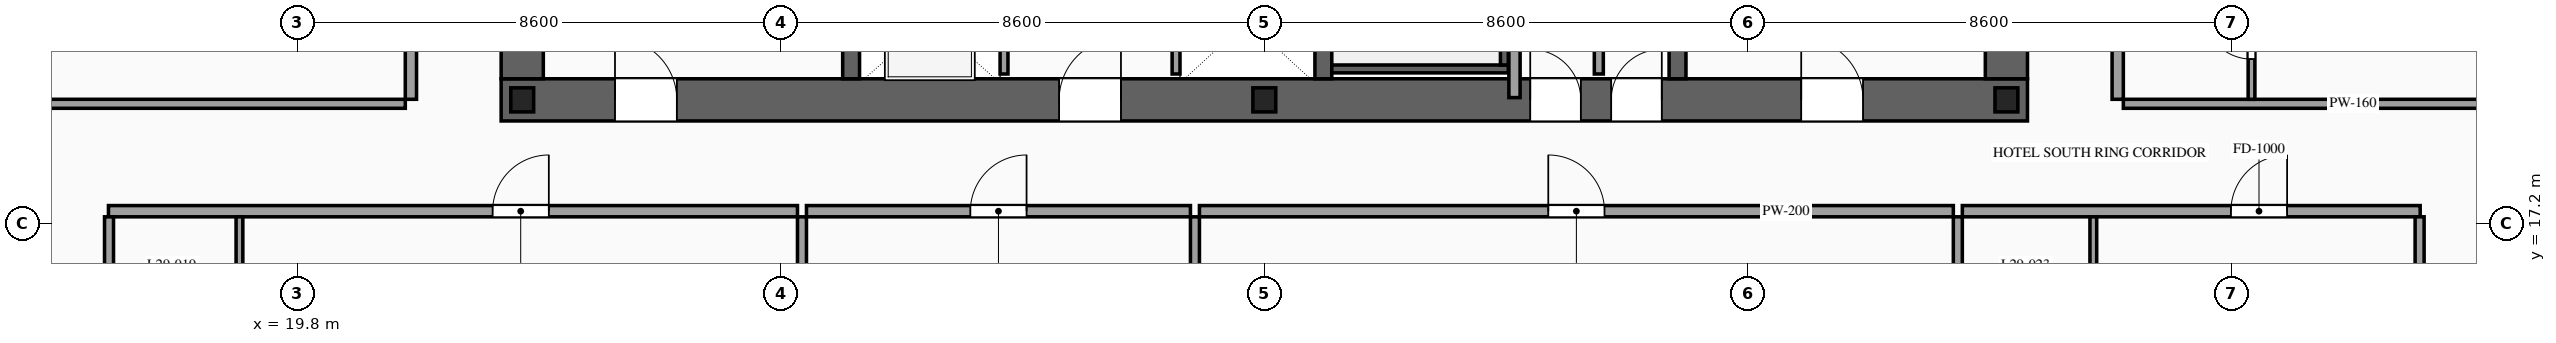
"""IFC4 building model, lengths in metres.
Left out: names, types, materials, properties, quantities, classifications, styles, units other than length and angle.
Written with IfcOpenShell. Run it as: python <this file> out.ifc"""

import sys

from ifc_helpers import new_model, si_unit, direction, frame, frame_2d, origin, origin_2d, place, context, subcontext, project, spatial, rectangle, i_section, extrude, source, transform, mapped, element, fill, save


model = new_model("IFC4")
c1 = context("Model", 3, precision=1e-05, world=origin(), true_north=direction((0.0, 1.0)))
c2 = subcontext(c1, "Body", "Model", "MODEL_VIEW")
j1 = project(units=[si_unit("LENGTHUNIT", "METRE"), si_unit("PLANEANGLEUNIT", "RADIAN")], contexts=[c1])
p1 = place(None, origin())
s1 = spatial("IfcSite", under=j1, at=p1, CompositionType="ELEMENT")
p2 = place(p1, origin())
s2 = spatial("IfcBuilding", under=s1, at=p2, CompositionType="ELEMENT")
p3 = place(p2, frame((0.0, 0.0, 111.8)))
s3 = spatial("IfcBuildingStorey", under=s2, at=p3, CompositionType="ELEMENT", Elevation=111.8)
p4 = place(p3, frame((23.425, 19.4, 0.0), z_axis=(0.0, 0.0, 1.0), x_axis=(1.0, 0.0, 0.0)))
e1 = element("IfcWall", 1, at=p4, inside=s3, PredefinedType="SHEAR", context=c2, shape_type="SweptSolid", body=[
    extrude(rectangle(XDim=27.15, YDim=0.75, at=frame_2d((13.575, 0.0))), origin(), (0.0, 0.0, 1.0), 3.6),
])
p5 = place(p4, frame((2.025, 0.0, 0.0)))
e2 = element("IfcOpeningElement", 2, at=p5, cuts=e1, PredefinedType="OPENING", context=c2, shape_type="SweptSolid", body=[
    extrude(rectangle(XDim=1.1, YDim=2.2, at=frame_2d((0.55, 1.1))), frame((0.0, 0.39, 0.0), z_axis=(0.0, -1.0, 0.0), x_axis=(1.0, 0.0, 0.0)), (0.0, 0.0, 1.0), 0.78),
])
p6 = place(p4, frame((9.925, 0.0, 0.0)))
e3 = element("IfcOpeningElement", 3, at=p6, cuts=e1, PredefinedType="OPENING", context=c2, shape_type="SweptSolid", body=[
    extrude(rectangle(XDim=1.1, YDim=2.2, at=frame_2d((0.55, 1.1))), frame((0.0, 0.39, 0.0), z_axis=(0.0, -1.0, 0.0), x_axis=(1.0, 0.0, 0.0)), (0.0, 0.0, 1.0), 0.78),
])
p7 = place(p4, frame((23.125, 0.0, 0.0)))
e4 = element("IfcOpeningElement", 4, at=p7, cuts=e1, PredefinedType="OPENING", context=c2, shape_type="SweptSolid", body=[
    extrude(rectangle(XDim=1.1, YDim=2.2, at=frame_2d((0.55, 1.1))), frame((0.0, 0.39, 0.0), z_axis=(0.0, -1.0, 0.0), x_axis=(1.0, 0.0, 0.0)), (0.0, 0.0, 1.0), 0.78),
])
p8 = place(p4, frame((19.745, 0.0, 0.0)))
e5 = element("IfcOpeningElement", 5, at=p8, cuts=e1, PredefinedType="OPENING", context=c2, shape_type="SweptSolid", body=[
    extrude(rectangle(XDim=0.9, YDim=2.15, at=frame_2d((0.45, 1.075))), frame((0.0, 0.39, 0.0), z_axis=(0.0, -1.0, 0.0), x_axis=(1.0, 0.0, 0.0)), (0.0, 0.0, 1.0), 0.78),
])
p9 = place(p4, frame((18.305, 0.0, 0.0)))
e6 = element("IfcOpeningElement", 6, at=p9, cuts=e1, PredefinedType="OPENING", context=c2, shape_type="SweptSolid", body=[
    extrude(rectangle(XDim=0.9, YDim=2.15, at=frame_2d((0.45, 1.075))), frame((0.0, 0.39, 0.0), z_axis=(0.0, -1.0, 0.0), x_axis=(1.0, 0.0, 0.0)), (0.0, 0.0, 1.0), 0.78),
])
m1 = source(origin(), c2, "Body", "SweptSolid", [
    extrude(rectangle(XDim=12.05, YDim=0.75, at=frame_2d((6.025, 0.0))), origin(), (0.0, 0.0, 1.0), 3.6),
])
for number, where, z_axis, x_axis in (
    (7, (23.8, 19.775, 0.0), (0.0, 0.0, 1.0), (0.0, 1.0, 0.0)),
    (8, (50.2, 19.775, 0.0), (0.0, 0.0, 1.0), (0.0, 1.0, 0.0)),
):
    element("IfcWall", number, at=place(p3, frame(where, z_axis=z_axis, x_axis=x_axis)), inside=s3, PredefinedType="SHEAR", context=c2, shape_type="MappedRepresentation", body=[
        mapped(m1, transform((0.0, 0.0, 0.0), scale=1.0)),
    ])
m2 = source(origin(), c2, "Body", "SweptSolid", [
    extrude(rectangle(XDim=12.05, YDim=0.3, at=frame_2d((6.025, 0.0))), origin(), (0.0, 0.0, 1.0), 3.6),
])
for number, where, z_axis, x_axis in (
    (9, (29.65, 19.775, 0.0), (0.0, 0.0, 1.0), (0.0, 1.0, 0.0)),
    (10, (38.05, 19.775, 0.0), (0.0, 0.0, 1.0), (0.0, 1.0, 0.0)),
    (11, (44.35, 19.775, 0.0), (0.0, 0.0, 1.0), (0.0, 1.0, 0.0)),
):
    element("IfcWall", number, at=place(p3, frame(where, z_axis=z_axis, x_axis=x_axis)), inside=s3, PredefinedType="SOLIDWALL", context=c2, shape_type="MappedRepresentation", body=[
        mapped(m2, transform((0.0, 0.0, 0.0), scale=1.0)),
    ])
m3 = source(origin(), c2, "Body", "SweptSolid", [
    extrude(i_section(OverallWidth=0.407, OverallDepth=0.428, WebThickness=0.02, FlangeThickness=0.035, at=origin_2d()), origin(), (0.0, 0.0, 1.0), 3.6),
])
for number, where, z_axis, x_axis in (
    (12, (23.8, 19.4, 0.0), (0.0, 0.0, 1.0), (1.0, 0.0, 0.0)),
    (13, (37.0, 19.4, 0.0), (0.0, 0.0, 1.0), (1.0, 0.0, 0.0)),
    (14, (50.2, 19.4, 0.0), (0.0, 0.0, 1.0), (1.0, 0.0, 0.0)),
):
    element("IfcColumn", number, at=place(p3, frame(where, z_axis=z_axis, x_axis=x_axis)), inside=s3, PredefinedType="COLUMN", context=c2, shape_type="MappedRepresentation", body=[
        mapped(m3, transform((0.0, 0.0, 0.0), scale=1.0)),
    ])
p10 = place(p3, frame((32.37, 19.86, 0.0), z_axis=(0.0, 0.0, 1.0), x_axis=(0.0, 1.0, 0.0)))
e15 = element("IfcWall", 15, at=p10, inside=s3, PredefinedType="SOLIDWALL", context=c2, shape_type="SweptSolid", body=[
    extrude(rectangle(XDim=2.04, YDim=0.14, at=frame_2d((1.02, 0.0))), origin(), (0.0, 0.0, 1.0), 3.38),
])
p11 = place(p10, frame((0.47, 0.0, 0.0)))
e16 = element("IfcOpeningElement", 16, at=p11, cuts=e15, PredefinedType="OPENING", context=c2, shape_type="SweptSolid", body=[
    extrude(rectangle(XDim=1.1, YDim=2.2, at=frame_2d((0.55, 1.1))), frame((0.0, 0.085, 0.0), z_axis=(0.0, -1.0, 0.0), x_axis=(1.0, 0.0, 0.0)), (0.0, 0.0, 1.0), 0.17),
])
m4 = source(origin(), c2, "Body", "SweptSolid", [
    extrude(rectangle(XDim=2.04, YDim=0.14, at=frame_2d((1.02, 0.0))), origin(), (0.0, 0.0, 1.0), 3.38),
])
p12 = place(p3, frame((35.43, 19.86, 0.0), z_axis=(0.0, 0.0, 1.0), x_axis=(0.0, 1.0, 0.0)))
e17 = element("IfcWall", 17, at=p12, inside=s3, PredefinedType="SOLIDWALL", context=c2, shape_type="MappedRepresentation", body=[
    mapped(m4, transform((0.0, 0.0, 0.0), scale=1.0)),
])
m5 = source(origin(), c2, "Body", "SweptSolid", [
    extrude(rectangle(XDim=3.14, YDim=0.14, at=frame_2d((1.57, 0.0))), origin(), (0.0, 0.0, 1.0), 3.38),
])
p13 = place(p3, frame((38.2, 19.95, 0.0), z_axis=(0.0, 0.0, 1.0), x_axis=(1.0, 0.0, 0.0)))
e18 = element("IfcWall", 18, at=p13, inside=s3, PredefinedType="SOLIDWALL", context=c2, shape_type="MappedRepresentation", body=[
    mapped(m5, transform((0.0, 0.0, 0.0), scale=1.0)),
])
m6 = source(origin(), c2, "Body", "SweptSolid", [
    extrude(rectangle(XDim=8.94, YDim=0.14, at=frame_2d((4.47, 0.0))), origin(), (0.0, 0.0, 1.0), 3.38),
])
p14 = place(p3, frame((41.27, 20.02, 0.0), z_axis=(0.0, 0.0, 1.0), x_axis=(0.0, 1.0, 0.0)))
e19 = element("IfcWall", 19, at=p14, inside=s3, PredefinedType="SOLIDWALL", context=c2, shape_type="MappedRepresentation", body=[
    mapped(m6, transform((0.0, 0.0, 0.0), scale=1.0)),
])
m7 = source(origin(), c2, "Body", "SweptSolid", [
    extrude(rectangle(XDim=1.34, YDim=0.16, at=frame_2d((0.67, 0.0))), origin(), (0.0, 0.0, 1.0), 3.38),
])
p15 = place(p3, frame((42.95, 19.86, 0.0), z_axis=(0.0, 0.0, 1.0), x_axis=(0.0, 1.0, 0.0)))
e20 = element("IfcWall", 20, at=p15, inside=s3, PredefinedType="PARTITIONING", context=c2, shape_type="MappedRepresentation", body=[
    mapped(m7, transform((0.0, 0.0, 0.0), scale=1.0)),
])
m8 = source(origin(), c2, "Body", "SweptSolid", [
    extrude(rectangle(XDim=6.51, YDim=0.2, at=frame_2d((3.255, 0.0))), origin(), (0.0, 0.0, 1.0), 3.38),
])
p16 = place(p3, frame((41.45, 19.44, 0.0), z_axis=(0.0, 0.0, 1.0), x_axis=(0.0, 1.0, 0.0)))
e21 = element("IfcWall", 21, at=p16, inside=s3, PredefinedType="PARTITIONING", context=c2, shape_type="MappedRepresentation", body=[
    mapped(m8, transform((0.0, 0.0, 0.0), scale=1.0)),
])
p17 = place(p3, frame((16.44, 17.42, 0.0), z_axis=(0.0, 0.0, 1.0), x_axis=(1.0, 0.0, 0.0)))
e22 = element("IfcWall", 22, at=p17, inside=s3, PredefinedType="PARTITIONING", context=c2, shape_type="SweptSolid", body=[
    extrude(rectangle(XDim=12.256, YDim=0.2, at=frame_2d((6.128, 0.0))), origin(), (0.0, 0.0, 1.0), 3.38),
])
p18 = place(p17, frame((6.833, 0.0, 0.0)))
e23 = element("IfcOpeningElement", 23, at=p18, cuts=e22, PredefinedType="OPENING", context=c2, shape_type="SweptSolid", body=[
    extrude(rectangle(XDim=1.0, YDim=2.2, at=frame_2d((0.5, 1.1))), frame((0.0, 0.115, 0.0), z_axis=(0.0, -1.0, 0.0), x_axis=(1.0, 0.0, 0.0)), (0.0, 0.0, 1.0), 0.23),
])
m9 = source(origin(), c2, "Body", "SweptSolid", [
    extrude(rectangle(XDim=14.97, YDim=0.16, at=frame_2d((7.485, 0.0))), origin(), (0.0, 0.0, 1.0), 3.38),
])
p19 = place(p3, frame((28.776, 2.35, 0.0), z_axis=(0.0, 0.0, 1.0), x_axis=(0.0, 1.0, 0.0)))
e24 = element("IfcWall", 24, at=p19, inside=s3, PredefinedType="PARTITIONING", context=c2, shape_type="MappedRepresentation", body=[
    mapped(m9, transform((0.0, 0.0, 0.0), scale=1.0)),
])
m10 = source(origin(), c2, "Body", "SweptSolid", [
    extrude(rectangle(XDim=2.42, YDim=0.12, at=frame_2d((1.21, 0.0))), origin(), (0.0, 0.0, 1.0), 3.38),
])
p20 = place(p3, frame((18.77, 14.9, 0.0), z_axis=(0.0, 0.0, 1.0), x_axis=(0.0, 1.0, 0.0)))
e25 = element("IfcWall", 25, at=p20, inside=s3, PredefinedType="PARTITIONING", context=c2, shape_type="MappedRepresentation", body=[
    mapped(m10, transform((0.0, 0.0, 0.0), scale=1.0)),
])
p21 = place(p3, frame((28.856, 17.42, 0.0), z_axis=(0.0, 0.0, 1.0), x_axis=(1.0, 0.0, 0.0)))
e26 = element("IfcWall", 26, at=p21, inside=s3, PredefinedType="PARTITIONING", context=c2, shape_type="SweptSolid", body=[
    extrude(rectangle(XDim=6.83, YDim=0.2, at=frame_2d((3.415, 0.0))), origin(), (0.0, 0.0, 1.0), 3.38),
])
p22 = place(p21, frame((2.915, 0.0, 0.0)))
e27 = element("IfcOpeningElement", 27, at=p22, cuts=e26, PredefinedType="OPENING", context=c2, shape_type="SweptSolid", body=[
    extrude(rectangle(XDim=1.0, YDim=2.2, at=frame_2d((0.5, 1.1))), frame((0.0, 0.115, 0.0), z_axis=(0.0, -1.0, 0.0), x_axis=(1.0, 0.0, 0.0)), (0.0, 0.0, 1.0), 0.23),
])
p23 = place(p3, frame((35.766, 2.35, 0.0), z_axis=(0.0, 0.0, 1.0), x_axis=(0.0, 1.0, 0.0)))
e28 = element("IfcWall", 28, at=p23, inside=s3, PredefinedType="PARTITIONING", context=c2, shape_type="MappedRepresentation", body=[
    mapped(m9, transform((0.0, 0.0, 0.0), scale=1.0)),
])
p24 = place(p3, frame((35.846, 17.42, 0.0), z_axis=(0.0, 0.0, 1.0), x_axis=(1.0, 0.0, 0.0)))
e29 = element("IfcWall", 29, at=p24, inside=s3, PredefinedType="PARTITIONING", context=c2, shape_type="SweptSolid", body=[
    extrude(rectangle(XDim=13.41, YDim=0.2, at=frame_2d((6.705, 0.0))), origin(), (0.0, 0.0, 1.0), 3.38),
])
p25 = place(p24, frame((6.205, 0.0, 0.0)))
e30 = element("IfcOpeningElement", 30, at=p25, cuts=e29, PredefinedType="OPENING", context=c2, shape_type="SweptSolid", body=[
    extrude(rectangle(XDim=1.0, YDim=2.2, at=frame_2d((0.5, 1.1))), frame((0.0, 0.115, 0.0), z_axis=(0.0, -1.0, 0.0), x_axis=(1.0, 0.0, 0.0)), (0.0, 0.0, 1.0), 0.23),
])
p26 = place(p3, frame((49.336, 2.35, 0.0), z_axis=(0.0, 0.0, 1.0), x_axis=(0.0, 1.0, 0.0)))
e31 = element("IfcWall", 31, at=p26, inside=s3, PredefinedType="PARTITIONING", context=c2, shape_type="MappedRepresentation", body=[
    mapped(m9, transform((0.0, 0.0, 0.0), scale=1.0)),
])
p27 = place(p3, frame((49.416, 17.42, 0.0), z_axis=(0.0, 0.0, 1.0), x_axis=(1.0, 0.0, 0.0)))
e32 = element("IfcWall", 32, at=p27, inside=s3, PredefinedType="PARTITIONING", context=c2, shape_type="SweptSolid", body=[
    extrude(rectangle(XDim=8.144, YDim=0.2, at=frame_2d((4.072, 0.0))), origin(), (0.0, 0.0, 1.0), 3.38),
])
p28 = place(p27, frame((4.777, 0.0, 0.0)))
e33 = element("IfcOpeningElement", 33, at=p28, cuts=e32, PredefinedType="OPENING", context=c2, shape_type="SweptSolid", body=[
    extrude(rectangle(XDim=1.0, YDim=2.2, at=frame_2d((0.5, 1.1))), frame((0.0, 0.115, 0.0), z_axis=(0.0, -1.0, 0.0), x_axis=(1.0, 0.0, 0.0)), (0.0, 0.0, 1.0), 0.23),
])
m11 = source(origin(), c2, "Body", "SweptSolid", [
    extrude(rectangle(XDim=14.82, YDim=0.16, at=frame_2d((7.41, 0.0))), origin(), (0.0, 0.0, 1.0), 3.38),
])
for number, where, z_axis, x_axis in (
    (34, (16.45, 2.5, 0.0), (0.0, 0.0, 1.0), (0.0, 1.0, 0.0)),
    (35, (57.55, 2.5, 0.0), (0.0, 0.0, 1.0), (0.0, 1.0, 0.0)),
):
    element("IfcWall", number, at=place(p3, frame(where, z_axis=z_axis, x_axis=x_axis)), inside=s3, PredefinedType="PARTITIONING", context=c2, shape_type="MappedRepresentation", body=[
        mapped(m11, transform((0.0, 0.0, 0.0), scale=1.0)),
    ])
p29 = place(p3, frame((51.746, 14.9, 0.0), z_axis=(0.0, 0.0, 1.0), x_axis=(0.0, 1.0, 0.0)))
e36 = element("IfcWall", 36, at=p29, inside=s3, PredefinedType="PARTITIONING", context=c2, shape_type="MappedRepresentation", body=[
    mapped(m10, transform((0.0, 0.0, 0.0), scale=1.0)),
])
p30 = place(p3, frame((21.82, 19.41, 0.0), z_axis=(0.0, 0.0, 1.0), x_axis=(0.0, 1.0, 0.0)))
e37 = element("IfcWall", 37, at=p30, inside=s3, PredefinedType="PARTITIONING", context=c2, shape_type="SweptSolid", body=[
    extrude(rectangle(XDim=12.78, YDim=0.2, at=frame_2d((6.39, 0.0))), origin(), (0.0, 0.0, 1.0), 3.38),
])
p31 = place(p30, frame((5.89, 0.0, 0.0)))
e38 = element("IfcOpeningElement", 38, at=p31, cuts=e37, PredefinedType="OPENING", context=c2, shape_type="SweptSolid", body=[
    extrude(rectangle(XDim=1.0, YDim=2.2, at=frame_2d((0.5, 1.1))), frame((0.0, 0.115, 0.0), z_axis=(0.0, -1.0, 0.0), x_axis=(1.0, 0.0, 0.0)), (0.0, 0.0, 1.0), 0.23),
])
m12 = source(origin(), c2, "Body", "SweptSolid", [
    extrude(rectangle(XDim=8.17, YDim=0.16, at=frame_2d((4.085, 0.0))), origin(), (0.0, 0.0, 1.0), 2.875),
])
p32 = place(p3, frame((13.55, 19.33, 0.0), z_axis=(0.0, 0.0, 1.0), x_axis=(1.0, 0.0, 0.0)))
e39 = element("IfcWall", 39, at=p32, inside=s3, PredefinedType="PARTITIONING", context=c2, shape_type="MappedRepresentation", body=[
    mapped(m12, transform((0.0, 0.0, 0.0), scale=1.0)),
])
p33 = place(p3, frame((52.18, 19.41, 0.0), z_axis=(0.0, 0.0, 1.0), x_axis=(0.0, 1.0, 0.0)))
e40 = element("IfcWall", 40, at=p33, inside=s3, PredefinedType="PARTITIONING", context=c2, shape_type="SweptSolid", body=[
    extrude(rectangle(XDim=6.31, YDim=0.2, at=frame_2d((3.155, 0.0))), origin(), (0.0, 0.0, 1.0), 3.38),
])
p34 = place(p33, frame((3.835, 0.0, 0.0)))
e41 = element("IfcOpeningElement", 41, at=p34, cuts=e40, PredefinedType="OPENING", context=c2, shape_type="SweptSolid", body=[
    extrude(rectangle(XDim=1.0, YDim=2.2, at=frame_2d((0.5, 1.1))), frame((0.0, 0.115, 0.0), z_axis=(0.0, -1.0, 0.0), x_axis=(1.0, 0.0, 0.0)), (0.0, 0.0, 1.0), 0.23),
])
p35 = place(p3, frame((52.28, 19.33, 0.0), z_axis=(0.0, 0.0, 1.0), x_axis=(1.0, 0.0, 0.0)))
e42 = element("IfcWall", 42, at=p35, inside=s3, PredefinedType="PARTITIONING", context=c2, shape_type="MappedRepresentation", body=[
    mapped(m12, transform((0.0, 0.0, 0.0), scale=1.0)),
])
p36 = place(p3, frame((54.56, 19.41, 0.0), z_axis=(0.0, 0.0, 1.0), x_axis=(0.0, 1.0, 0.0)))
e43 = element("IfcWall", 43, at=p36, inside=s3, PredefinedType="PARTITIONING", context=c2, shape_type="SweptSolid", body=[
    extrude(rectangle(XDim=2.28, YDim=0.12, at=frame_2d((1.14, 0.0))), origin(), (0.0, 0.0, 1.0), 3.38),
])
p37 = place(p36, frame((0.715, 0.0, 0.0)))
e44 = element("IfcOpeningElement", 44, at=p37, cuts=e43, PredefinedType="OPENING", context=c2, shape_type="SweptSolid", body=[
    extrude(rectangle(XDim=0.85, YDim=2.1, at=frame_2d((0.425, 1.05))), frame((0.0, 0.075, 0.0), z_axis=(0.0, -1.0, 0.0), x_axis=(1.0, 0.0, 0.0)), (0.0, 0.0, 1.0), 0.15),
])
m13 = source(origin(), c2, "Body", "SweptSolid", [
    extrude(rectangle(XDim=1.1, YDim=2.2, at=frame_2d((0.55, 1.1))), frame((0.0, 0.025, 0.0), z_axis=(0.0, -1.0, 0.0), x_axis=(1.0, 0.0, 0.0)), (0.0, 0.0, 1.0), 0.05),
])
p38 = place(p5, origin())
e45 = element("IfcDoor", 45, at=p38, inside=s3, OperationType="SINGLE_SWING_LEFT", PredefinedType="DOOR", context=c2, shape_type="MappedRepresentation", body=[
    mapped(m13, transform((0.0, 0.0, 0.0), scale=1.0)),
])
fill(e2, e45)
p39 = place(p6, origin())
e46 = element("IfcDoor", 46, at=p39, inside=s3, OperationType="SINGLE_SWING_RIGHT", PredefinedType="DOOR", context=c2, shape_type="MappedRepresentation", body=[
    mapped(m13, transform((0.0, 0.0, 0.0), scale=1.0)),
])
fill(e3, e46)
p40 = place(p7, origin())
e47 = element("IfcDoor", 47, at=p40, inside=s3, OperationType="SINGLE_SWING_LEFT", PredefinedType="DOOR", context=c2, shape_type="MappedRepresentation", body=[
    mapped(m13, transform((0.0, 0.0, 0.0), scale=1.0)),
])
fill(e4, e47)
m14 = source(origin(), c2, "Body", "SweptSolid", [
    extrude(rectangle(XDim=0.9, YDim=2.15, at=frame_2d((0.45, 1.075))), frame((0.0, 0.025, 0.0), z_axis=(0.0, -1.0, 0.0), x_axis=(1.0, 0.0, 0.0)), (0.0, 0.0, 1.0), 0.05),
])
p41 = place(p8, origin())
e48 = element("IfcDoor", 48, at=p41, inside=s3, OperationType="SINGLE_SWING_RIGHT", PredefinedType="DOOR", context=c2, shape_type="MappedRepresentation", body=[
    mapped(m14, transform((0.0, 0.0, 0.0), scale=1.0)),
])
fill(e5, e48)
p42 = place(p9, origin())
e49 = element("IfcDoor", 49, at=p42, inside=s3, OperationType="SINGLE_SWING_LEFT", PredefinedType="DOOR", context=c2, shape_type="MappedRepresentation", body=[
    mapped(m14, transform((0.0, 0.0, 0.0), scale=1.0)),
])
fill(e6, e49)
m15 = source(origin(), c2, "Body", "SweptSolid", [
    extrude(rectangle(XDim=1.0, YDim=2.2, at=frame_2d((0.5, 1.1))), frame((0.0, 0.025, 0.0), z_axis=(0.0, -1.0, 0.0), x_axis=(1.0, 0.0, 0.0)), (0.0, 0.0, 1.0), 0.05),
])
p43 = place(p18, origin())
e50 = element("IfcDoor", 50, at=p43, inside=s3, OperationType="SINGLE_SWING_RIGHT", PredefinedType="DOOR", context=c2, shape_type="MappedRepresentation", body=[
    mapped(m15, transform((0.0, 0.0, 0.0), scale=1.0)),
])
fill(e23, e50)
p44 = place(p22, origin())
e51 = element("IfcDoor", 51, at=p44, inside=s3, OperationType="SINGLE_SWING_RIGHT", PredefinedType="DOOR", context=c2, shape_type="MappedRepresentation", body=[
    mapped(m15, transform((0.0, 0.0, 0.0), scale=1.0)),
])
fill(e27, e51)
p45 = place(p25, origin())
e52 = element("IfcDoor", 52, at=p45, inside=s3, OperationType="SINGLE_SWING_LEFT", PredefinedType="DOOR", context=c2, shape_type="MappedRepresentation", body=[
    mapped(m15, transform((0.0, 0.0, 0.0), scale=1.0)),
])
fill(e30, e52)
p46 = place(p28, origin())
e53 = element("IfcDoor", 53, at=p46, inside=s3, OperationType="SINGLE_SWING_RIGHT", PredefinedType="DOOR", context=c2, shape_type="MappedRepresentation", body=[
    mapped(m15, transform((0.0, 0.0, 0.0), scale=1.0)),
])
fill(e33, e53)
m16 = source(origin(), c2, "Body", "SweptSolid", [
    extrude(rectangle(XDim=0.85, YDim=2.1, at=frame_2d((0.425, 1.05))), frame((0.0, 0.025, 0.0), z_axis=(0.0, -1.0, 0.0), x_axis=(1.0, 0.0, 0.0)), (0.0, 0.0, 1.0), 0.05),
])
p47 = place(p37, origin())
e54 = element("IfcDoor", 54, at=p47, inside=s3, OperationType="SINGLE_SWING_RIGHT", PredefinedType="DOOR", context=c2, shape_type="MappedRepresentation", body=[
    mapped(m16, transform((0.0, 0.0, 0.0), scale=1.0)),
])
fill(e44, e54)
save(model, sys.argv[1])
